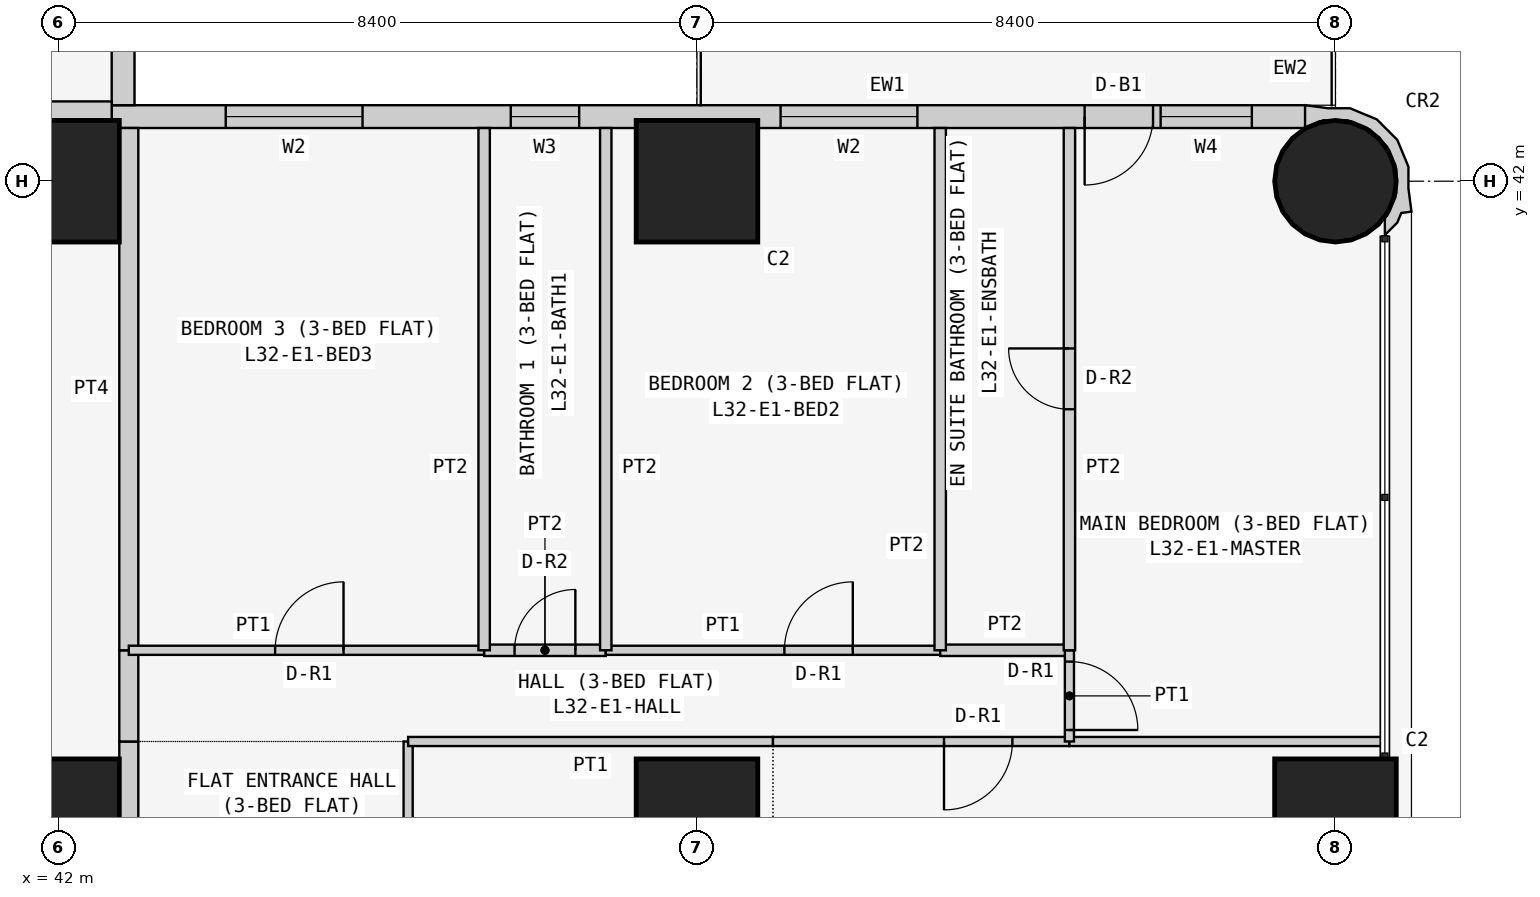
"""IFC4 building model, lengths in metres.
Left out: names, types, materials, properties, quantities, classifications, styles, units other than length and angle.
Written with IfcOpenShell. Run it as: python <this file> out.ifc"""

import sys

from ifc_helpers import new_model, si_unit, direction, frame, frame_2d, origin, origin_2d, place, context, subcontext, project, spatial, polyline, rectangle, circle, outline, extrude, element, fill, save


model = new_model("IFC4")
c1 = context("Model", 3, precision=1e-05, world=origin(), true_north=direction((0.0, 1.0)))
c2 = subcontext(c1, "Body", "Model", "MODEL_VIEW")
j1 = project(units=[si_unit("LENGTHUNIT", "METRE"), si_unit("PLANEANGLEUNIT", "RADIAN")], contexts=[c1])
p1 = place(None, origin())
s1 = spatial("IfcSite", under=j1, at=p1, CompositionType="ELEMENT")
p2 = place(p1, origin())
s2 = spatial("IfcBuilding", under=s1, at=p2, CompositionType="ELEMENT")
p3 = place(p2, frame((0.0, 0.0, 126.9)))
s3 = spatial("IfcBuildingStorey", under=s2, at=p3, CompositionType="ELEMENT", Elevation=126.9)
for number, where, z_axis, x_axis in (
    (1, (42.0, 33.6, 0.0), (0.0, 0.0, 1.0), (1.0, 0.0, 0.0)),
    (2, (42.0, 42.0, 0.0), (0.0, 0.0, 1.0), (1.0, 0.0, 0.0)),
    (3, (50.4, 33.6, 0.0), (0.0, 0.0, 1.0), (1.0, 0.0, 0.0)),
    (4, (50.4, 42.0, 0.0), (0.0, 0.0, 1.0), (1.0, 0.0, 0.0)),
    (5, (58.8, 33.6, 0.0), (0.0, 0.0, 1.0), (1.0, 0.0, 0.0)),
):
    element("IfcColumn", number, at=place(p3, frame(where, z_axis=z_axis, x_axis=x_axis)), inside=s3, PredefinedType="COLUMN", context=c2, shape_type="SweptSolid", body=[
        extrude(rectangle(XDim=1.6, YDim=1.6, at=origin_2d()), origin(), (0.0, 0.0, 1.0), 3.6),
    ])
p4 = place(p3, frame((58.8, 42.0, 0.0), z_axis=(0.0, 0.0, 1.0), x_axis=(1.0, 0.0, 0.0)))
e6 = element("IfcColumn", 6, at=p4, inside=s3, PredefinedType="COLUMN", context=c2, shape_type="SweptSolid", body=[
    extrude(circle(Radius=0.8, at=origin_2d()), origin(), (0.0, 0.0, 1.0), 3.6),
])
p5 = place(p3, frame((58.4, 42.85, 0.0), z_axis=(0.0, 0.0, 1.0), x_axis=(-1.0, 0.0, 0.0)))
e7 = element("IfcWall", 7, at=p5, inside=s3, PredefinedType="SOLIDWALL", context=c2, shape_type="SweptSolid", body=[
    extrude(rectangle(XDim=15.7, YDim=0.3, at=frame_2d((7.85, 0.0))), origin(), (0.0, 0.0, 1.0), 3.45),
])
p6 = place(p5, frame((12.4, 0.0, 0.9)))
e8 = element("IfcOpeningElement", 8, at=p6, cuts=e7, PredefinedType="OPENING", context=c2, shape_type="SweptSolid", body=[
    extrude(rectangle(XDim=1.8, YDim=1.5, at=frame_2d((0.9, 0.75))), frame((0.0, 0.16, 0.0), z_axis=(0.0, -1.0, 0.0), x_axis=(1.0, 0.0, 0.0)), (0.0, 0.0, 1.0), 0.32),
])
p7 = place(p5, frame((9.55, 0.0, 1.5)))
e9 = element("IfcOpeningElement", 9, at=p7, cuts=e7, PredefinedType="OPENING", context=c2, shape_type="SweptSolid", body=[
    extrude(rectangle(XDim=0.9, YDim=0.7, at=frame_2d((0.45, 0.35))), frame((0.0, 0.16, 0.0), z_axis=(0.0, -1.0, 0.0), x_axis=(1.0, 0.0, 0.0)), (0.0, 0.0, 1.0), 0.32),
])
p8 = place(p5, frame((5.1, 0.0, 0.9)))
e10 = element("IfcOpeningElement", 10, at=p8, cuts=e7, PredefinedType="OPENING", context=c2, shape_type="SweptSolid", body=[
    extrude(rectangle(XDim=1.8, YDim=1.5, at=frame_2d((0.9, 0.75))), frame((0.0, 0.16, 0.0), z_axis=(0.0, -1.0, 0.0), x_axis=(1.0, 0.0, 0.0)), (0.0, 0.0, 1.0), 0.32),
])
p9 = place(p5, frame((2.0, 0.0, 0.0)))
e11 = element("IfcOpeningElement", 11, at=p9, cuts=e7, PredefinedType="OPENING", context=c2, shape_type="SweptSolid", body=[
    extrude(rectangle(XDim=0.9, YDim=2.4, at=frame_2d((0.45, 1.2))), frame((0.0, 0.16, 0.0), z_axis=(0.0, -1.0, 0.0), x_axis=(1.0, 0.0, 0.0)), (0.0, 0.0, 1.0), 0.32),
])
p10 = place(p5, frame((0.7, 0.0, 0.9)))
e12 = element("IfcOpeningElement", 12, at=p10, cuts=e7, PredefinedType="OPENING", context=c2, shape_type="SweptSolid", body=[
    extrude(rectangle(XDim=1.2, YDim=1.5, at=frame_2d((0.6, 0.75))), frame((0.0, 0.16, 0.0), z_axis=(0.0, -1.0, 0.0), x_axis=(1.0, 0.0, 0.0)), (0.0, 0.0, 1.0), 0.32),
])
p11 = place(p3, frame((42.85, 43.0, 0.0), z_axis=(0.0, 0.0, 1.0), x_axis=(0.0, 1.0, 0.0)))
e13 = element("IfcWall", 13, at=p11, inside=s3, PredefinedType="SOLIDWALL", context=c2, shape_type="SweptSolid", body=[
    extrude(rectangle(XDim=7.0, YDim=0.3, at=frame_2d((3.5, 0.0))), origin(), (0.0, 0.0, 1.0), 3.45),
])
p12 = place(p11, frame((1.5, 0.0, 0.9)))
e14 = element("IfcOpeningElement", 14, at=p12, cuts=e13, PredefinedType="OPENING", context=c2, shape_type="SweptSolid", body=[
    extrude(rectangle(XDim=2.4, YDim=1.5, at=frame_2d((1.2, 0.75))), frame((0.0, 0.16, 0.0), z_axis=(0.0, -1.0, 0.0), x_axis=(1.0, 0.0, 0.0)), (0.0, 0.0, 1.0), 0.32),
])
p13 = place(p11, frame((5.05, 0.0, 0.9)))
e15 = element("IfcOpeningElement", 15, at=p13, cuts=e13, PredefinedType="OPENING", context=c2, shape_type="SweptSolid", body=[
    extrude(rectangle(XDim=1.2, YDim=1.5, at=frame_2d((0.6, 0.75))), frame((0.0, 0.16, 0.0), z_axis=(0.0, -1.0, 0.0), x_axis=(1.0, 0.0, 0.0)), (0.0, 0.0, 1.0), 0.32),
])
p14 = place(p3, frame((59.395, 41.352, 0.0), z_axis=(0.0, 0.0, 1.0), x_axis=(0.93923434088, 0.343276641956, 0.0)))
e16 = element("IfcWall", 16, at=p14, inside=s3, PredefinedType="SOLIDWALL", context=c2, shape_type="SweptSolid", body=[
    extrude(outline(polyline([(0.532, 0.393), (0.631, 0.663), (0.614, 1.044), (0.453, 1.391), (0.172, 1.649), (-0.097, 1.748), (-0.369, 1.89), (-0.509, 1.621), (-0.491, 1.615), (-0.479, 1.609), (-0.211, 1.62), (0.088, 1.511), (0.323, 1.295), (0.457, 1.006), (0.47, 0.688), (0.361, 0.389), (0.145, 0.154), (0.108, 0.136), (0.031, -0.075), (0.241, 0.023), (0.333, 0.124), (0.465, 0.094), (0.532, 0.393)])), origin(), (0.0, 0.0, 1.0), 3.45),
])
p15 = place(p3, frame((35.829, 42.925, 0.0), z_axis=(0.0, 0.0, 1.0), x_axis=(1.0, 0.0, 0.0)))
e17 = element("IfcWall", 17, at=p15, inside=s3, PredefinedType="PARTITIONING", context=c2, shape_type="SweptSolid", body=[
    extrude(rectangle(XDim=6.871, YDim=0.25, at=frame_2d((3.436, 0.0))), origin(), (0.0, 0.0, 1.0), 3.45),
])
p16 = place(p3, frame((42.925, 34.629, 0.0), z_axis=(0.0, 0.0, 1.0), x_axis=(0.0, -1.0, 0.0)))
e18 = element("IfcWall", 18, at=p16, inside=s3, PredefinedType="PARTITIONING", context=c2, shape_type="SweptSolid", body=[
    extrude(rectangle(XDim=5.229, YDim=0.25, at=frame_2d((2.615, 0.0))), origin(), (0.0, 0.0, 1.0), 3.45),
])
p17 = place(p16, frame((2.129, 0.0, 0.0)))
e19 = element("IfcOpeningElement", 19, at=p17, cuts=e18, PredefinedType="OPENING", context=c2, shape_type="SweptSolid", body=[
    extrude(rectangle(XDim=1.0, YDim=2.1, at=frame_2d((0.5, 1.05))), frame((0.0, 0.135, 0.0), z_axis=(0.0, -1.0, 0.0), x_axis=(1.0, 0.0, 0.0)), (0.0, 0.0, 1.0), 0.27),
])
p18 = place(p3, frame((42.925, 35.829, 0.0), z_axis=(0.0, 0.0, 1.0), x_axis=(0.0, -1.0, 0.0)))
e20 = element("IfcWall", 20, at=p18, inside=s3, PredefinedType="PARTITIONING", context=c2, shape_type="SweptSolid", body=[
    extrude(rectangle(XDim=1.2, YDim=0.25, at=frame_2d((0.6, 0.0))), origin(), (0.0, 0.0, 1.0), 3.45),
])
p19 = place(p3, frame((42.925, 42.7, 0.0), z_axis=(0.0, 0.0, 1.0), x_axis=(0.0, -1.0, 0.0)))
e21 = element("IfcWall", 21, at=p19, inside=s3, PredefinedType="PARTITIONING", context=c2, shape_type="SweptSolid", body=[
    extrude(rectangle(XDim=6.871, YDim=0.25, at=frame_2d((3.436, 0.0))), origin(), (0.0, 0.0, 1.0), 3.45),
])
p20 = place(p3, frame((46.6, 29.4, 0.0), z_axis=(0.0, 0.0, 1.0), x_axis=(0.0, 1.0, 0.0)))
e22 = element("IfcWall", 22, at=p20, inside=s3, PredefinedType="PARTITIONING", context=c2, shape_type="SweptSolid", body=[
    extrude(rectangle(XDim=5.229, YDim=0.12, at=frame_2d((2.615, 0.0))), origin(), (0.0, 0.0, 1.0), 3.45),
])
p21 = place(p20, frame((1.05, 0.0, 0.0)))
e23 = element("IfcOpeningElement", 23, at=p21, cuts=e22, PredefinedType="OPENING", context=c2, shape_type="SweptSolid", body=[
    extrude(rectangle(XDim=0.9, YDim=2.1, at=frame_2d((0.45, 1.05))), frame((0.0, 0.07, 0.0), z_axis=(0.0, -1.0, 0.0), x_axis=(1.0, 0.0, 0.0)), (0.0, 0.0, 1.0), 0.14),
])
p22 = place(p3, frame((51.4, 34.629, 0.0), z_axis=(0.0, 0.0, 1.0), x_axis=(-1.0, 0.0, 0.0)))
e24 = element("IfcWall", 24, at=p22, inside=s3, PredefinedType="PARTITIONING", context=c2, shape_type="SweptSolid", body=[
    extrude(rectangle(XDim=4.8, YDim=0.12, at=frame_2d((2.4, 0.0))), origin(), (0.0, 0.0, 1.0), 3.45),
])
p23 = place(p3, frame((55.3, 34.629, 0.0), z_axis=(0.0, 0.0, 1.0), x_axis=(-1.0, 0.0, 0.0)))
e25 = element("IfcWall", 25, at=p23, inside=s3, PredefinedType="PARTITIONING", context=c2, shape_type="SweptSolid", body=[
    extrude(rectangle(XDim=3.9, YDim=0.12, at=frame_2d((1.95, 0.0))), origin(), (0.0, 0.0, 1.0), 3.45),
])
p24 = place(p23, frame((0.75, 0.0, 0.0)))
e26 = element("IfcOpeningElement", 26, at=p24, cuts=e25, PredefinedType="OPENING", context=c2, shape_type="SweptSolid", body=[
    extrude(rectangle(XDim=0.9, YDim=2.1, at=frame_2d((0.45, 1.05))), frame((0.0, 0.07, 0.0), z_axis=(0.0, -1.0, 0.0), x_axis=(1.0, 0.0, 0.0)), (0.0, 0.0, 1.0), 0.14),
])
p25 = place(p3, frame((59.45, 34.629, 0.0), z_axis=(0.0, 0.0, 1.0), x_axis=(-1.0, 0.0, 0.0)))
e27 = element("IfcWall", 27, at=p25, inside=s3, PredefinedType="PARTITIONING", context=c2, shape_type="SweptSolid", body=[
    extrude(rectangle(XDim=4.15, YDim=0.12, at=frame_2d((2.075, 0.0))), origin(), (0.0, 0.0, 1.0), 3.45),
])
p26 = place(p3, frame((47.6, 35.829, 0.0), z_axis=(0.0, 0.0, 1.0), x_axis=(-1.0, 0.0, 0.0)))
e28 = element("IfcWall", 28, at=p26, inside=s3, PredefinedType="PARTITIONING", context=c2, shape_type="SweptSolid", body=[
    extrude(rectangle(XDim=4.675, YDim=0.12, at=frame_2d((2.337, 0.0))), origin(), (0.0, 0.0, 1.0), 3.45),
])
p27 = place(p26, frame((1.85, 0.0, 0.0)))
e29 = element("IfcOpeningElement", 29, at=p27, cuts=e28, PredefinedType="OPENING", context=c2, shape_type="SweptSolid", body=[
    extrude(rectangle(XDim=0.9, YDim=2.1, at=frame_2d((0.45, 1.05))), frame((0.0, 0.07, 0.0), z_axis=(0.0, -1.0, 0.0), x_axis=(1.0, 0.0, 0.0)), (0.0, 0.0, 1.0), 0.14),
])
p28 = place(p3, frame((49.2, 35.829, 0.0), z_axis=(0.0, 0.0, 1.0), x_axis=(-1.0, 0.0, 0.0)))
e30 = element("IfcWall", 30, at=p28, inside=s3, PredefinedType="PARTITIONING", context=c2, shape_type="SweptSolid", body=[
    extrude(rectangle(XDim=1.6, YDim=0.15, at=frame_2d((0.8, 0.0))), origin(), (0.0, 0.0, 1.0), 3.45),
])
p29 = place(p28, frame((0.4, 0.0, 0.0)))
e31 = element("IfcOpeningElement", 31, at=p29, cuts=e30, PredefinedType="OPENING", context=c2, shape_type="SweptSolid", body=[
    extrude(rectangle(XDim=0.8, YDim=2.1, at=frame_2d((0.4, 1.05))), frame((0.0, 0.085, 0.0), z_axis=(0.0, -1.0, 0.0), x_axis=(1.0, 0.0, 0.0)), (0.0, 0.0, 1.0), 0.17),
])
p30 = place(p3, frame((53.6, 35.829, 0.0), z_axis=(0.0, 0.0, 1.0), x_axis=(-1.0, 0.0, 0.0)))
e32 = element("IfcWall", 32, at=p30, inside=s3, PredefinedType="PARTITIONING", context=c2, shape_type="SweptSolid", body=[
    extrude(rectangle(XDim=4.4, YDim=0.12, at=frame_2d((2.2, 0.0))), origin(), (0.0, 0.0, 1.0), 3.45),
])
p31 = place(p30, frame((1.15, 0.0, 0.0)))
e33 = element("IfcOpeningElement", 33, at=p31, cuts=e32, PredefinedType="OPENING", context=c2, shape_type="SweptSolid", body=[
    extrude(rectangle(XDim=0.9, YDim=2.1, at=frame_2d((0.45, 1.05))), frame((0.0, 0.07, 0.0), z_axis=(0.0, -1.0, 0.0), x_axis=(1.0, 0.0, 0.0)), (0.0, 0.0, 1.0), 0.14),
])
p32 = place(p3, frame((55.3, 35.829, 0.0), z_axis=(0.0, 0.0, 1.0), x_axis=(-1.0, 0.0, 0.0)))
e34 = element("IfcWall", 34, at=p32, inside=s3, PredefinedType="PARTITIONING", context=c2, shape_type="SweptSolid", body=[
    extrude(rectangle(XDim=1.7, YDim=0.15, at=frame_2d((0.85, 0.0))), origin(), (0.0, 0.0, 1.0), 3.45),
])
p33 = place(p3, frame((55.3, 34.629, 0.0), z_axis=(0.0, 0.0, 1.0), x_axis=(0.0, 1.0, 0.0)))
e35 = element("IfcWall", 35, at=p33, inside=s3, PredefinedType="PARTITIONING", context=c2, shape_type="SweptSolid", body=[
    extrude(rectangle(XDim=1.2, YDim=0.12, at=frame_2d((0.6, 0.0))), origin(), (0.0, 0.0, 1.0), 3.45),
])
p34 = place(p33, frame((0.151, 0.0, 0.0)))
e36 = element("IfcOpeningElement", 36, at=p34, cuts=e35, PredefinedType="OPENING", context=c2, shape_type="SweptSolid", body=[
    extrude(rectangle(XDim=0.9, YDim=2.1, at=frame_2d((0.45, 1.05))), frame((0.0, 0.07, 0.0), z_axis=(0.0, -1.0, 0.0), x_axis=(1.0, 0.0, 0.0)), (0.0, 0.0, 1.0), 0.14),
])
for number, where, z_axis, x_axis in (
    (37, (47.6, 35.829, 0.0), (0.0, 0.0, 1.0), (0.0, 1.0, 0.0)),
    (38, (49.2, 35.829, 0.0), (0.0, 0.0, 1.0), (0.0, 1.0, 0.0)),
    (39, (53.6, 35.829, 0.0), (0.0, 0.0, 1.0), (0.0, 1.0, 0.0)),
):
    element("IfcWall", number, at=place(p3, frame(where, z_axis=z_axis, x_axis=x_axis)), inside=s3, PredefinedType="PARTITIONING", context=c2, shape_type="SweptSolid", body=[
        extrude(rectangle(XDim=6.871, YDim=0.15, at=frame_2d((3.436, 0.0))), origin(), (0.0, 0.0, 1.0), 3.45),
    ])
p35 = place(p3, frame((55.3, 35.829, 0.0), z_axis=(0.0, 0.0, 1.0), x_axis=(0.0, 1.0, 0.0)))
e40 = element("IfcWall", 40, at=p35, inside=s3, PredefinedType="PARTITIONING", context=c2, shape_type="SweptSolid", body=[
    extrude(rectangle(XDim=6.871, YDim=0.15, at=frame_2d((3.436, 0.0))), origin(), (0.0, 0.0, 1.0), 3.45),
])
p36 = place(p35, frame((3.171, 0.0, 0.0)))
e41 = element("IfcOpeningElement", 41, at=p36, cuts=e40, PredefinedType="OPENING", context=c2, shape_type="SweptSolid", body=[
    extrude(rectangle(XDim=0.8, YDim=2.1, at=frame_2d((0.4, 1.05))), frame((0.0, 0.085, 0.0), z_axis=(0.0, -1.0, 0.0), x_axis=(1.0, 0.0, 0.0)), (0.0, 0.0, 1.0), 0.17),
])
p37 = place(p6, origin())
e42 = element("IfcWindow", 42, at=p37, inside=s3, PartitioningType="SINGLE_PANEL", PredefinedType="WINDOW", context=c2, shape_type="SweptSolid", body=[
    extrude(rectangle(XDim=1.8, YDim=1.5, at=frame_2d((0.9, 0.75))), frame((0.0, 0.03, 0.0), z_axis=(0.0, -1.0, 0.0), x_axis=(1.0, 0.0, 0.0)), (0.0, 0.0, 1.0), 0.06),
])
fill(e8, e42)
p38 = place(p7, origin())
e43 = element("IfcWindow", 43, at=p38, inside=s3, PartitioningType="SINGLE_PANEL", PredefinedType="WINDOW", context=c2, shape_type="SweptSolid", body=[
    extrude(rectangle(XDim=0.9, YDim=0.7, at=frame_2d((0.45, 0.35))), frame((0.0, 0.03, 0.0), z_axis=(0.0, -1.0, 0.0), x_axis=(1.0, 0.0, 0.0)), (0.0, 0.0, 1.0), 0.06),
])
fill(e9, e43)
p39 = place(p8, origin())
e44 = element("IfcWindow", 44, at=p39, inside=s3, PartitioningType="SINGLE_PANEL", PredefinedType="WINDOW", context=c2, shape_type="SweptSolid", body=[
    extrude(rectangle(XDim=1.8, YDim=1.5, at=frame_2d((0.9, 0.75))), frame((0.0, 0.03, 0.0), z_axis=(0.0, -1.0, 0.0), x_axis=(1.0, 0.0, 0.0)), (0.0, 0.0, 1.0), 0.06),
])
fill(e10, e44)
p40 = place(p9, origin())
e45 = element("IfcDoor", 45, at=p40, inside=s3, OperationType="SINGLE_SWING_RIGHT", PredefinedType="DOOR", context=c2, shape_type="SweptSolid", body=[
    extrude(rectangle(XDim=0.9, YDim=2.4, at=frame_2d((0.45, 1.2))), frame((0.0, 0.025, 0.0), z_axis=(0.0, -1.0, 0.0), x_axis=(1.0, 0.0, 0.0)), (0.0, 0.0, 1.0), 0.05),
])
fill(e11, e45)
p41 = place(p10, origin())
e46 = element("IfcWindow", 46, at=p41, inside=s3, PartitioningType="SINGLE_PANEL", PredefinedType="WINDOW", context=c2, shape_type="SweptSolid", body=[
    extrude(rectangle(XDim=1.2, YDim=1.5, at=frame_2d((0.6, 0.75))), frame((0.0, 0.03, 0.0), z_axis=(0.0, -1.0, 0.0), x_axis=(1.0, 0.0, 0.0)), (0.0, 0.0, 1.0), 0.06),
])
fill(e12, e46)
p42 = place(p24, origin())
e47 = element("IfcDoor", 47, at=p42, inside=s3, OperationType="SINGLE_SWING_RIGHT", PredefinedType="DOOR", context=c2, shape_type="SweptSolid", body=[
    extrude(rectangle(XDim=0.9, YDim=2.1, at=frame_2d((0.45, 1.05))), frame((0.0, 0.025, 0.0), z_axis=(0.0, -1.0, 0.0), x_axis=(1.0, 0.0, 0.0)), (0.0, 0.0, 1.0), 0.05),
])
fill(e26, e47)
p43 = place(p27, frame((0.9, 0.0, 0.0), z_axis=(0.0, 0.0, 1.0), x_axis=(-1.0, 0.0, 0.0)))
e48 = element("IfcDoor", 48, at=p43, inside=s3, OperationType="SINGLE_SWING_RIGHT", PredefinedType="DOOR", context=c2, shape_type="SweptSolid", body=[
    extrude(rectangle(XDim=0.9, YDim=2.1, at=frame_2d((0.45, 1.05))), frame((0.0, 0.025, 0.0), z_axis=(0.0, -1.0, 0.0), x_axis=(1.0, 0.0, 0.0)), (0.0, 0.0, 1.0), 0.05),
])
fill(e29, e48)
p44 = place(p29, frame((0.8, 0.0, 0.0), z_axis=(0.0, 0.0, 1.0), x_axis=(-1.0, 0.0, 0.0)))
e49 = element("IfcDoor", 49, at=p44, inside=s3, OperationType="SINGLE_SWING_RIGHT", PredefinedType="DOOR", context=c2, shape_type="SweptSolid", body=[
    extrude(rectangle(XDim=0.8, YDim=2.1, at=frame_2d((0.4, 1.05))), frame((0.0, 0.025, 0.0), z_axis=(0.0, -1.0, 0.0), x_axis=(1.0, 0.0, 0.0)), (0.0, 0.0, 1.0), 0.05),
])
fill(e31, e49)
p45 = place(p31, frame((0.9, 0.0, 0.0), z_axis=(0.0, 0.0, 1.0), x_axis=(-1.0, 0.0, 0.0)))
e50 = element("IfcDoor", 50, at=p45, inside=s3, OperationType="SINGLE_SWING_RIGHT", PredefinedType="DOOR", context=c2, shape_type="SweptSolid", body=[
    extrude(rectangle(XDim=0.9, YDim=2.1, at=frame_2d((0.45, 1.05))), frame((0.0, 0.025, 0.0), z_axis=(0.0, -1.0, 0.0), x_axis=(1.0, 0.0, 0.0)), (0.0, 0.0, 1.0), 0.05),
])
fill(e33, e50)
p46 = place(p34, frame((0.9, 0.0, 0.0), z_axis=(0.0, 0.0, 1.0), x_axis=(-1.0, 0.0, 0.0)))
e51 = element("IfcDoor", 51, at=p46, inside=s3, OperationType="SINGLE_SWING_RIGHT", PredefinedType="DOOR", context=c2, shape_type="SweptSolid", body=[
    extrude(rectangle(XDim=0.9, YDim=2.1, at=frame_2d((0.45, 1.05))), frame((0.0, 0.025, 0.0), z_axis=(0.0, -1.0, 0.0), x_axis=(1.0, 0.0, 0.0)), (0.0, 0.0, 1.0), 0.05),
])
fill(e36, e51)
p47 = place(p36, origin())
e52 = element("IfcDoor", 52, at=p47, inside=s3, OperationType="SINGLE_SWING_RIGHT", PredefinedType="DOOR", context=c2, shape_type="SweptSolid", body=[
    extrude(rectangle(XDim=0.8, YDim=2.1, at=frame_2d((0.4, 1.05))), frame((0.0, 0.025, 0.0), z_axis=(0.0, -1.0, 0.0), x_axis=(1.0, 0.0, 0.0)), (0.0, 0.0, 1.0), 0.05),
])
fill(e41, e52)
save(model, sys.argv[1])
